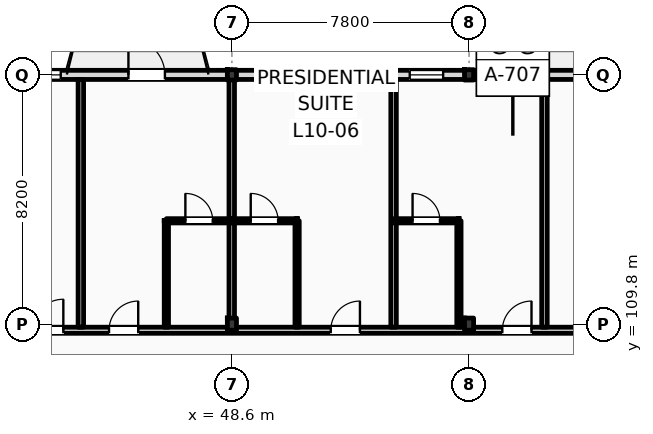
"""IFC4 building model, lengths in metres.
Left out: names, types, materials, properties, quantities, classifications, styles, units other than length and angle.
Written with IfcOpenShell. Run it as: python <this file> out.ifc"""

import sys

from ifc_helpers import new_model, si_unit, direction, frame, frame_2d, origin, origin_2d, place, context, subcontext, project, spatial, rectangle, i_section, extrude, element, fill, save


model = new_model("IFC4")
c1 = context("Model", 3, precision=1e-05, world=origin(), true_north=direction((0.0, 1.0)))
c2 = subcontext(c1, "Body", "Model", "MODEL_VIEW")
j1 = project(units=[si_unit("LENGTHUNIT", "METRE"), si_unit("PLANEANGLEUNIT", "RADIAN")], contexts=[c1])
p1 = place(None, origin())
s1 = spatial("IfcSite", under=j1, at=p1, CompositionType="ELEMENT")
p2 = place(p1, origin())
s2 = spatial("IfcBuilding", under=s1, at=p2, CompositionType="ELEMENT")
p3 = place(p2, frame((0.0, 0.0, 42.6)))
s3 = spatial("IfcBuildingStorey", under=s2, at=p3, CompositionType="ELEMENT", Elevation=42.6)
p4 = place(p3, frame((48.6, 109.8, 0.0), z_axis=(0.0, 0.0, 1.0), x_axis=(1.0, 0.0, 0.0)))
e1 = element("IfcColumn", 1, at=p4, inside=s3, PredefinedType="COLUMN", context=c2, shape_type="SweptSolid", body=[
    extrude(i_section(OverallWidth=0.3, OverallDepth=0.4, WebThickness=0.013, FlangeThickness=0.024, FilletRadius=0.027, at=origin_2d()), origin(), (0.0, 0.0, 1.0), 4.2),
])
p5 = place(p3, frame((48.6, 118.0, 0.0), z_axis=(0.0, 0.0, 1.0), x_axis=(1.0, 0.0, 0.0)))
e2 = element("IfcColumn", 2, at=p5, inside=s3, PredefinedType="COLUMN", context=c2, shape_type="SweptSolid", body=[
    extrude(i_section(OverallWidth=0.3, OverallDepth=0.34, WebThickness=0.012, FlangeThickness=0.021, FilletRadius=0.027, at=origin_2d()), origin(), (0.0, 0.0, 1.0), 4.2),
])
p6 = place(p3, frame((56.4, 109.8, 0.0), z_axis=(0.0, 0.0, 1.0), x_axis=(1.0, 0.0, 0.0)))
e3 = element("IfcColumn", 3, at=p6, inside=s3, PredefinedType="COLUMN", context=c2, shape_type="SweptSolid", body=[
    extrude(i_section(OverallWidth=0.3, OverallDepth=0.4, WebThickness=0.013, FlangeThickness=0.024, FilletRadius=0.027, at=origin_2d()), origin(), (0.0, 0.0, 1.0), 4.2),
])
p7 = place(p3, frame((56.4, 118.0, 0.0), z_axis=(0.0, 0.0, 1.0), x_axis=(1.0, 0.0, 0.0)))
e4 = element("IfcColumn", 4, at=p7, inside=s3, PredefinedType="COLUMN", context=c2, shape_type="SweptSolid", body=[
    extrude(i_section(OverallWidth=0.3, OverallDepth=0.34, WebThickness=0.012, FlangeThickness=0.021, FilletRadius=0.027, at=origin_2d()), origin(), (0.0, 0.0, 1.0), 4.2),
])
p8 = place(p3, frame((22.5, 118.0, 0.0), z_axis=(0.0, 0.0, 1.0), x_axis=(1.0, 0.0, 0.0)))
e5 = element("IfcWall", 5, at=p8, inside=s3, PredefinedType="STANDARD", context=c2, shape_type="SweptSolid", body=[
    extrude(rectangle(XDim=72.9, YDim=0.3, at=frame_2d((36.45, 0.0))), origin(), (0.0, 0.0, 1.0), 3.42),
])
p9 = place(p8, frame((3.611, 0.0, 0.9)))
e6 = element("IfcOpeningElement", 6, at=p9, cuts=e5, PredefinedType="OPENING", context=c2, shape_type="SweptSolid", body=[
    extrude(rectangle(XDim=1.35, YDim=1.75, at=frame_2d((0.675, 0.875))), frame((0.0, 0.16, 0.0), z_axis=(0.0, -1.0, 0.0), x_axis=(1.0, 0.0, 0.0)), (0.0, 0.0, 1.0), 0.32),
])
p10 = place(p8, frame((7.091, 0.0, 0.0)))
e7 = element("IfcOpeningElement", 7, at=p10, cuts=e5, PredefinedType="OPENING", context=c2, shape_type="SweptSolid", body=[
    extrude(rectangle(XDim=1.2, YDim=2.25, at=frame_2d((0.6, 1.125))), frame((0.0, 0.16, 0.0), z_axis=(0.0, -1.0, 0.0), x_axis=(1.0, 0.0, 0.0)), (0.0, 0.0, 1.0), 0.32),
])
p11 = place(p8, frame((12.328, 0.0, 0.9)))
e8 = element("IfcOpeningElement", 8, at=p11, cuts=e5, PredefinedType="OPENING", context=c2, shape_type="SweptSolid", body=[
    extrude(rectangle(XDim=2.0, YDim=2.34, at=frame_2d((1.0, 1.17))), frame((0.0, 0.16, 0.0), z_axis=(0.0, -1.0, 0.0), x_axis=(1.0, 0.0, 0.0)), (0.0, 0.0, 1.0), 0.32),
])
p12 = place(p8, frame((19.12, 0.0, 0.9)))
e9 = element("IfcOpeningElement", 9, at=p12, cuts=e5, PredefinedType="OPENING", context=c2, shape_type="SweptSolid", body=[
    extrude(rectangle(XDim=1.35, YDim=2.34, at=frame_2d((0.675, 1.17))), frame((0.0, 0.16, 0.0), z_axis=(0.0, -1.0, 0.0), x_axis=(1.0, 0.0, 0.0)), (0.0, 0.0, 1.0), 0.32),
])
p13 = place(p8, frame((22.696, 0.0, 0.0)))
e10 = element("IfcOpeningElement", 10, at=p13, cuts=e5, PredefinedType="OPENING", context=c2, shape_type="SweptSolid", body=[
    extrude(rectangle(XDim=1.2, YDim=2.25, at=frame_2d((0.6, 1.125))), frame((0.0, 0.16, 0.0), z_axis=(0.0, -1.0, 0.0), x_axis=(1.0, 0.0, 0.0)), (0.0, 0.0, 1.0), 0.32),
])
p14 = place(p8, frame((27.205, 0.0, 0.9)))
e11 = element("IfcOpeningElement", 11, at=p14, cuts=e5, PredefinedType="OPENING", context=c2, shape_type="SweptSolid", body=[
    extrude(rectangle(XDim=3.1, YDim=2.34, at=frame_2d((1.55, 1.17))), frame((0.0, 0.16, 0.0), z_axis=(0.0, -1.0, 0.0), x_axis=(1.0, 0.0, 0.0)), (0.0, 0.0, 1.0), 0.32),
])
p15 = place(p8, frame((31.948, 0.0, 0.9)))
e12 = element("IfcOpeningElement", 12, at=p15, cuts=e5, PredefinedType="OPENING", context=c2, shape_type="SweptSolid", body=[
    extrude(rectangle(XDim=1.1, YDim=2.34, at=frame_2d((0.55, 1.17))), frame((0.0, 0.16, 0.0), z_axis=(0.0, -1.0, 0.0), x_axis=(1.0, 0.0, 0.0)), (0.0, 0.0, 1.0), 0.32),
])
p16 = place(p8, frame((38.12, 0.0, 0.0)))
e13 = element("IfcOpeningElement", 13, at=p16, cuts=e5, PredefinedType="OPENING", context=c2, shape_type="SweptSolid", body=[
    extrude(rectangle(XDim=1.2, YDim=2.25, at=frame_2d((0.6, 1.125))), frame((0.0, 0.16, 0.0), z_axis=(0.0, -1.0, 0.0), x_axis=(1.0, 0.0, 0.0)), (0.0, 0.0, 1.0), 0.32),
])
p17 = place(p8, frame((43.51, 0.0, 0.9)))
e14 = element("IfcOpeningElement", 14, at=p17, cuts=e5, PredefinedType="OPENING", context=c2, shape_type="SweptSolid", body=[
    extrude(rectangle(XDim=1.35, YDim=1.85, at=frame_2d((0.675, 0.925))), frame((0.0, 0.16, 0.0), z_axis=(0.0, -1.0, 0.0), x_axis=(1.0, 0.0, 0.0)), (0.0, 0.0, 1.0), 0.32),
])
p18 = place(p8, frame((47.178, 0.0, 0.9)))
e15 = element("IfcOpeningElement", 15, at=p18, cuts=e5, PredefinedType="OPENING", context=c2, shape_type="SweptSolid", body=[
    extrude(rectangle(XDim=1.5, YDim=1.9, at=frame_2d((0.75, 0.95))), frame((0.0, 0.16, 0.0), z_axis=(0.0, -1.0, 0.0), x_axis=(1.0, 0.0, 0.0)), (0.0, 0.0, 1.0), 0.32),
])
p19 = place(p8, frame((53.724, 0.0, 0.0)))
e16 = element("IfcOpeningElement", 16, at=p19, cuts=e5, PredefinedType="OPENING", context=c2, shape_type="SweptSolid", body=[
    extrude(rectangle(XDim=1.2, YDim=2.25, at=frame_2d((0.6, 1.125))), frame((0.0, 0.16, 0.0), z_axis=(0.0, -1.0, 0.0), x_axis=(1.0, 0.0, 0.0)), (0.0, 0.0, 1.0), 0.32),
])
p20 = place(p8, frame((58.712, 0.0, 0.9)))
e17 = element("IfcOpeningElement", 17, at=p20, cuts=e5, PredefinedType="OPENING", context=c2, shape_type="SweptSolid", body=[
    extrude(rectangle(XDim=1.8, YDim=2.0, at=frame_2d((0.9, 1.0))), frame((0.0, 0.16, 0.0), z_axis=(0.0, -1.0, 0.0), x_axis=(1.0, 0.0, 0.0)), (0.0, 0.0, 1.0), 0.32),
])
p21 = place(p8, frame((62.781, 0.0, 0.9)))
e18 = element("IfcOpeningElement", 18, at=p21, cuts=e5, PredefinedType="OPENING", context=c2, shape_type="SweptSolid", body=[
    extrude(rectangle(XDim=1.35, YDim=2.05, at=frame_2d((0.675, 1.025))), frame((0.0, 0.16, 0.0), z_axis=(0.0, -1.0, 0.0), x_axis=(1.0, 0.0, 0.0)), (0.0, 0.0, 1.0), 0.32),
])
p22 = place(p8, frame((68.819, 0.0, 0.9)))
e19 = element("IfcOpeningElement", 19, at=p22, cuts=e5, PredefinedType="OPENING", context=c2, shape_type="SweptSolid", body=[
    extrude(rectangle(XDim=2.1, YDim=2.1, at=frame_2d((1.05, 1.05))), frame((0.0, 0.16, 0.0), z_axis=(0.0, -1.0, 0.0), x_axis=(1.0, 0.0, 0.0)), (0.0, 0.0, 1.0), 0.32),
])
p23 = place(p3, frame((10.65, 109.6, 0.0), z_axis=(0.0, 0.0, 1.0), x_axis=(1.0, 0.0, 0.0)))
e20 = element("IfcWall", 20, at=p23, inside=s3, PredefinedType="PARTITIONING", context=c2, shape_type="SweptSolid", body=[
    extrude(rectangle(XDim=84.61, YDim=0.2, at=frame_2d((42.305, 0.0))), origin(), (0.0, 0.0, 1.0), 3.38),
])
p24 = place(p23, frame((15.926, 0.0, 0.0)))
e21 = element("IfcOpeningElement", 21, at=p24, cuts=e20, PredefinedType="OPENING", context=c2, shape_type="SweptSolid", body=[
    extrude(rectangle(XDim=1.02, YDim=2.2, at=frame_2d((0.51, 1.1))), frame((0.0, 0.11, 0.0), z_axis=(0.0, -1.0, 0.0), x_axis=(1.0, 0.0, 0.0)), (0.0, 0.0, 1.0), 0.22),
])
p25 = place(p23, frame((18.45, 0.0, 0.0)))
e22 = element("IfcOpeningElement", 22, at=p25, cuts=e20, PredefinedType="OPENING", context=c2, shape_type="SweptSolid", body=[
    extrude(rectangle(XDim=1.02, YDim=2.2, at=frame_2d((0.51, 1.1))), frame((0.0, 0.11, 0.0), z_axis=(0.0, -1.0, 0.0), x_axis=(1.0, 0.0, 0.0)), (0.0, 0.0, 1.0), 0.22),
])
p26 = place(p23, frame((25.742, 0.0, 0.0)))
e23 = element("IfcOpeningElement", 23, at=p26, cuts=e20, PredefinedType="OPENING", context=c2, shape_type="SweptSolid", body=[
    extrude(rectangle(XDim=1.02, YDim=2.2, at=frame_2d((0.51, 1.1))), frame((0.0, 0.11, 0.0), z_axis=(0.0, -1.0, 0.0), x_axis=(1.0, 0.0, 0.0)), (0.0, 0.0, 1.0), 0.22),
])
p27 = place(p23, frame((31.385, 0.0, 0.0)))
e24 = element("IfcOpeningElement", 24, at=p27, cuts=e20, PredefinedType="OPENING", context=c2, shape_type="SweptSolid", body=[
    extrude(rectangle(XDim=1.02, YDim=2.2, at=frame_2d((0.51, 1.1))), frame((0.0, 0.11, 0.0), z_axis=(0.0, -1.0, 0.0), x_axis=(1.0, 0.0, 0.0)), (0.0, 0.0, 1.0), 0.22),
])
p28 = place(p23, frame((33.908, 0.0, 0.0)))
e25 = element("IfcOpeningElement", 25, at=p28, cuts=e20, PredefinedType="OPENING", context=c2, shape_type="SweptSolid", body=[
    extrude(rectangle(XDim=0.96, YDim=2.2, at=frame_2d((0.48, 1.1))), frame((0.0, 0.11, 0.0), z_axis=(0.0, -1.0, 0.0), x_axis=(1.0, 0.0, 0.0)), (0.0, 0.0, 1.0), 0.22),
])
p29 = place(p23, frame((41.201, 0.0, 0.0)))
e26 = element("IfcOpeningElement", 26, at=p29, cuts=e20, PredefinedType="OPENING", context=c2, shape_type="SweptSolid", body=[
    extrude(rectangle(XDim=0.96, YDim=2.2, at=frame_2d((0.48, 1.1))), frame((0.0, 0.11, 0.0), z_axis=(0.0, -1.0, 0.0), x_axis=(1.0, 0.0, 0.0)), (0.0, 0.0, 1.0), 0.22),
])
p30 = place(p23, frame((46.844, 0.0, 0.0)))
e27 = element("IfcOpeningElement", 27, at=p30, cuts=e20, PredefinedType="OPENING", context=c2, shape_type="SweptSolid", body=[
    extrude(rectangle(XDim=0.96, YDim=2.2, at=frame_2d((0.48, 1.1))), frame((0.0, 0.11, 0.0), z_axis=(0.0, -1.0, 0.0), x_axis=(1.0, 0.0, 0.0)), (0.0, 0.0, 1.0), 0.22),
])
p31 = place(p23, frame((49.337, 0.0, 0.0)))
e28 = element("IfcOpeningElement", 28, at=p31, cuts=e20, PredefinedType="OPENING", context=c2, shape_type="SweptSolid", body=[
    extrude(rectangle(XDim=0.96, YDim=2.2, at=frame_2d((0.48, 1.1))), frame((0.0, 0.11, 0.0), z_axis=(0.0, -1.0, 0.0), x_axis=(1.0, 0.0, 0.0)), (0.0, 0.0, 1.0), 0.22),
])
p32 = place(p23, frame((56.63, 0.0, 0.0)))
e29 = element("IfcOpeningElement", 29, at=p32, cuts=e20, PredefinedType="OPENING", context=c2, shape_type="SweptSolid", body=[
    extrude(rectangle(XDim=0.96, YDim=2.2, at=frame_2d((0.48, 1.1))), frame((0.0, 0.11, 0.0), z_axis=(0.0, -1.0, 0.0), x_axis=(1.0, 0.0, 0.0)), (0.0, 0.0, 1.0), 0.22),
])
p33 = place(p23, frame((62.523, 0.0, 0.0)))
e30 = element("IfcOpeningElement", 30, at=p33, cuts=e20, PredefinedType="OPENING", context=c2, shape_type="SweptSolid", body=[
    extrude(rectangle(XDim=0.96, YDim=2.2, at=frame_2d((0.48, 1.1))), frame((0.0, 0.11, 0.0), z_axis=(0.0, -1.0, 0.0), x_axis=(1.0, 0.0, 0.0)), (0.0, 0.0, 1.0), 0.22),
])
p34 = place(p23, frame((64.765, 0.0, 0.0)))
e31 = element("IfcOpeningElement", 31, at=p34, cuts=e20, PredefinedType="OPENING", context=c2, shape_type="SweptSolid", body=[
    extrude(rectangle(XDim=0.96, YDim=2.2, at=frame_2d((0.48, 1.1))), frame((0.0, 0.11, 0.0), z_axis=(0.0, -1.0, 0.0), x_axis=(1.0, 0.0, 0.0)), (0.0, 0.0, 1.0), 0.22),
])
p35 = place(p23, frame((72.057, 0.0, 0.0)))
e32 = element("IfcOpeningElement", 32, at=p35, cuts=e20, PredefinedType="OPENING", context=c2, shape_type="SweptSolid", body=[
    extrude(rectangle(XDim=0.96, YDim=2.2, at=frame_2d((0.48, 1.1))), frame((0.0, 0.11, 0.0), z_axis=(0.0, -1.0, 0.0), x_axis=(1.0, 0.0, 0.0)), (0.0, 0.0, 1.0), 0.22),
])
p36 = place(p23, frame((74.55, 0.0, 0.0)))
e33 = element("IfcOpeningElement", 33, at=p36, cuts=e20, PredefinedType="OPENING", context=c2, shape_type="SweptSolid", body=[
    extrude(rectangle(XDim=0.96, YDim=2.2, at=frame_2d((0.48, 1.1))), frame((0.0, 0.11, 0.0), z_axis=(0.0, -1.0, 0.0), x_axis=(1.0, 0.0, 0.0)), (0.0, 0.0, 1.0), 0.22),
])
p37 = place(p23, frame((80.163, 0.0, 0.0)))
e34 = element("IfcOpeningElement", 34, at=p37, cuts=e20, PredefinedType="OPENING", context=c2, shape_type="SweptSolid", body=[
    extrude(rectangle(XDim=0.96, YDim=2.2, at=frame_2d((0.48, 1.1))), frame((0.0, 0.11, 0.0), z_axis=(0.0, -1.0, 0.0), x_axis=(1.0, 0.0, 0.0)), (0.0, 0.0, 1.0), 0.22),
])
p38 = place(p23, frame((2.716, 0.0, 0.0)))
e35 = element("IfcOpeningElement", 35, at=p38, cuts=e20, PredefinedType="OPENING", context=c2, shape_type="SweptSolid", body=[
    extrude(rectangle(XDim=1.35, YDim=2.25, at=frame_2d((0.675, 1.125))), frame((0.0, 0.11, 0.0), z_axis=(0.0, -1.0, 0.0), x_axis=(1.0, 0.0, 0.0)), (0.0, 0.0, 1.0), 0.22),
])
p39 = place(p23, frame((6.65, 0.0, 0.0)))
e36 = element("IfcOpeningElement", 36, at=p39, cuts=e20, PredefinedType="OPENING", context=c2, shape_type="SweptSolid", body=[
    extrude(rectangle(XDim=1.35, YDim=2.25, at=frame_2d((0.675, 1.125))), frame((0.0, 0.11, 0.0), z_axis=(0.0, -1.0, 0.0), x_axis=(1.0, 0.0, 0.0)), (0.0, 0.0, 1.0), 0.22),
])
p40 = place(p23, frame((10.583, 0.0, 0.0)))
e37 = element("IfcOpeningElement", 37, at=p40, cuts=e20, PredefinedType="OPENING", context=c2, shape_type="SweptSolid", body=[
    extrude(rectangle(XDim=1.35, YDim=2.25, at=frame_2d((0.675, 1.125))), frame((0.0, 0.11, 0.0), z_axis=(0.0, -1.0, 0.0), x_axis=(1.0, 0.0, 0.0)), (0.0, 0.0, 1.0), 0.22),
])
p41 = place(p3, frame((43.631, 109.7, 0.0), z_axis=(0.0, 0.0, 1.0), x_axis=(0.0, 1.0, 0.0)))
e38 = element("IfcWall", 38, at=p41, inside=s3, PredefinedType="PARTITIONING", context=c2, shape_type="SweptSolid", body=[
    extrude(rectangle(XDim=8.15, YDim=0.18, at=frame_2d((4.075, 0.0))), origin(), (0.0, 0.0, 1.0), 3.63),
])
p42 = place(p3, frame((48.594, 109.7, 0.0), z_axis=(0.0, 0.0, 1.0), x_axis=(0.0, 1.0, 0.0)))
e39 = element("IfcWall", 39, at=p42, inside=s3, PredefinedType="PARTITIONING", context=c2, shape_type="SweptSolid", body=[
    extrude(rectangle(XDim=8.15, YDim=0.18, at=frame_2d((4.075, 0.0))), origin(), (0.0, 0.0, 1.0), 3.57),
])
p43 = place(p3, frame((46.444, 109.7, 0.0), z_axis=(0.0, 0.0, 1.0), x_axis=(0.0, 1.0, 0.0)))
e40 = element("IfcWall", 40, at=p43, inside=s3, PredefinedType="PARTITIONING", context=c2, shape_type="SweptSolid", body=[
    extrude(rectangle(XDim=3.5, YDim=0.14, at=frame_2d((1.75, 0.0))), origin(), (0.0, 0.0, 1.0), 3.94),
])
p44 = place(p3, frame((46.444, 113.2, 0.0), z_axis=(0.0, 0.0, 1.0), x_axis=(1.0, 0.0, 0.0)))
e41 = element("IfcWall", 41, at=p44, inside=s3, PredefinedType="PARTITIONING", context=c2, shape_type="SweptSolid", body=[
    extrude(rectangle(XDim=2.15, YDim=0.14, at=frame_2d((1.075, 0.0))), origin(), (0.0, 0.0, 1.0), 3.94),
])
p45 = place(p44, frame((0.625, 0.0, 0.0)))
e42 = element("IfcOpeningElement", 42, at=p45, cuts=e41, PredefinedType="OPENING", context=c2, shape_type="SweptSolid", body=[
    extrude(rectangle(XDim=0.9, YDim=2.1, at=frame_2d((0.45, 1.05))), frame((0.0, 0.08, 0.0), z_axis=(0.0, -1.0, 0.0), x_axis=(1.0, 0.0, 0.0)), (0.0, 0.0, 1.0), 0.16),
])
p46 = place(p3, frame((53.917, 109.7, 0.0), z_axis=(0.0, 0.0, 1.0), x_axis=(0.0, 1.0, 0.0)))
e43 = element("IfcWall", 43, at=p46, inside=s3, PredefinedType="PARTITIONING", context=c2, shape_type="SweptSolid", body=[
    extrude(rectangle(XDim=8.15, YDim=0.18, at=frame_2d((4.075, 0.0))), origin(), (0.0, 0.0, 1.0), 3.63),
])
p47 = place(p3, frame((50.744, 109.7, 0.0), z_axis=(0.0, 0.0, 1.0), x_axis=(0.0, 1.0, 0.0)))
e44 = element("IfcWall", 44, at=p47, inside=s3, PredefinedType="PARTITIONING", context=c2, shape_type="SweptSolid", body=[
    extrude(rectangle(XDim=3.5, YDim=0.14, at=frame_2d((1.75, 0.0))), origin(), (0.0, 0.0, 1.0), 3.94),
])
p48 = place(p3, frame((48.594, 113.2, 0.0), z_axis=(0.0, 0.0, 1.0), x_axis=(1.0, 0.0, 0.0)))
e45 = element("IfcWall", 45, at=p48, inside=s3, PredefinedType="PARTITIONING", context=c2, shape_type="SweptSolid", body=[
    extrude(rectangle(XDim=2.15, YDim=0.14, at=frame_2d((1.075, 0.0))), origin(), (0.0, 0.0, 1.0), 3.94),
])
p49 = place(p48, frame((0.625, 0.0, 0.0)))
e46 = element("IfcOpeningElement", 46, at=p49, cuts=e45, PredefinedType="OPENING", context=c2, shape_type="SweptSolid", body=[
    extrude(rectangle(XDim=0.9, YDim=2.1, at=frame_2d((0.45, 1.05))), frame((0.0, 0.08, 0.0), z_axis=(0.0, -1.0, 0.0), x_axis=(1.0, 0.0, 0.0)), (0.0, 0.0, 1.0), 0.16),
])
p50 = place(p3, frame((58.88, 109.7, 0.0), z_axis=(0.0, 0.0, 1.0), x_axis=(0.0, 1.0, 0.0)))
e47 = element("IfcWall", 47, at=p50, inside=s3, PredefinedType="PARTITIONING", context=c2, shape_type="SweptSolid", body=[
    extrude(rectangle(XDim=8.15, YDim=0.18, at=frame_2d((4.075, 0.0))), origin(), (0.0, 0.0, 1.0), 3.63),
])
p51 = place(p3, frame((56.067, 109.7, 0.0), z_axis=(0.0, 0.0, 1.0), x_axis=(0.0, 1.0, 0.0)))
e48 = element("IfcWall", 48, at=p51, inside=s3, PredefinedType="PARTITIONING", context=c2, shape_type="SweptSolid", body=[
    extrude(rectangle(XDim=3.5, YDim=0.14, at=frame_2d((1.75, 0.0))), origin(), (0.0, 0.0, 1.0), 3.94),
])
p52 = place(p3, frame((53.917, 113.2, 0.0), z_axis=(0.0, 0.0, 1.0), x_axis=(1.0, 0.0, 0.0)))
e49 = element("IfcWall", 49, at=p52, inside=s3, PredefinedType="PARTITIONING", context=c2, shape_type="SweptSolid", body=[
    extrude(rectangle(XDim=2.15, YDim=0.14, at=frame_2d((1.075, 0.0))), origin(), (0.0, 0.0, 1.0), 3.94),
])
p53 = place(p52, frame((0.625, 0.0, 0.0)))
e50 = element("IfcOpeningElement", 50, at=p53, cuts=e49, PredefinedType="OPENING", context=c2, shape_type="SweptSolid", body=[
    extrude(rectangle(XDim=0.9, YDim=2.1, at=frame_2d((0.45, 1.05))), frame((0.0, 0.08, 0.0), z_axis=(0.0, -1.0, 0.0), x_axis=(1.0, 0.0, 0.0)), (0.0, 0.0, 1.0), 0.16),
])
p54 = place(p12, origin())
e51 = element("IfcWindow", 51, at=p54, inside=s3, PartitioningType="DOUBLE_PANEL_VERTICAL", PredefinedType="WINDOW", context=c2, shape_type="SweptSolid", body=[
    extrude(rectangle(XDim=1.35, YDim=2.34, at=frame_2d((0.675, 1.17))), frame((0.0, 0.03, 0.0), z_axis=(0.0, -1.0, 0.0), x_axis=(1.0, 0.0, 0.0)), (0.0, 0.0, 1.0), 0.06),
])
fill(e9, e51)
p55 = place(p13, origin())
e52 = element("IfcDoor", 52, at=p55, inside=s3, OperationType="SINGLE_SWING_LEFT", PredefinedType="DOOR", context=c2, shape_type="SweptSolid", body=[
    extrude(rectangle(XDim=1.2, YDim=2.25, at=frame_2d((0.6, 1.125))), frame((0.0, 0.025, 0.0), z_axis=(0.0, -1.0, 0.0), x_axis=(1.0, 0.0, 0.0)), (0.0, 0.0, 1.0), 0.05),
])
fill(e10, e52)
p56 = place(p14, origin())
e53 = element("IfcWindow", 53, at=p56, inside=s3, PartitioningType="DOUBLE_PANEL_VERTICAL", PredefinedType="WINDOW", context=c2, shape_type="SweptSolid", body=[
    extrude(rectangle(XDim=3.1, YDim=2.34, at=frame_2d((1.55, 1.17))), frame((0.0, 0.03, 0.0), z_axis=(0.0, -1.0, 0.0), x_axis=(1.0, 0.0, 0.0)), (0.0, 0.0, 1.0), 0.06),
])
fill(e11, e53)
p57 = place(p15, origin())
e54 = element("IfcWindow", 54, at=p57, inside=s3, PartitioningType="DOUBLE_PANEL_VERTICAL", PredefinedType="WINDOW", context=c2, shape_type="SweptSolid", body=[
    extrude(rectangle(XDim=1.1, YDim=2.34, at=frame_2d((0.55, 1.17))), frame((0.0, 0.03, 0.0), z_axis=(0.0, -1.0, 0.0), x_axis=(1.0, 0.0, 0.0)), (0.0, 0.0, 1.0), 0.06),
])
fill(e12, e54)
p58 = place(p27, origin())
e55 = element("IfcDoor", 55, at=p58, inside=s3, OperationType="SINGLE_SWING_RIGHT", PredefinedType="DOOR", context=c2, shape_type="SweptSolid", body=[
    extrude(rectangle(XDim=1.02, YDim=2.2, at=frame_2d((0.51, 1.1))), frame((0.0, 0.025, 0.0), z_axis=(0.0, -1.0, 0.0), x_axis=(1.0, 0.0, 0.0)), (0.0, 0.0, 1.0), 0.05),
])
fill(e24, e55)
p59 = place(p28, origin())
e56 = element("IfcDoor", 56, at=p59, inside=s3, OperationType="SINGLE_SWING_RIGHT", PredefinedType="DOOR", context=c2, shape_type="SweptSolid", body=[
    extrude(rectangle(XDim=0.96, YDim=2.2, at=frame_2d((0.48, 1.1))), frame((0.0, 0.025, 0.0), z_axis=(0.0, -1.0, 0.0), x_axis=(1.0, 0.0, 0.0)), (0.0, 0.0, 1.0), 0.05),
])
fill(e25, e56)
p60 = place(p45, origin())
e57 = element("IfcDoor", 57, at=p60, inside=s3, OperationType="SINGLE_SWING_LEFT", PredefinedType="DOOR", context=c2, shape_type="SweptSolid", body=[
    extrude(rectangle(XDim=0.9, YDim=2.1, at=frame_2d((0.45, 1.05))), frame((0.0, 0.025, 0.0), z_axis=(0.0, -1.0, 0.0), x_axis=(1.0, 0.0, 0.0)), (0.0, 0.0, 1.0), 0.05),
])
fill(e42, e57)
p61 = place(p29, origin())
e58 = element("IfcDoor", 58, at=p61, inside=s3, OperationType="SINGLE_SWING_RIGHT", PredefinedType="DOOR", context=c2, shape_type="SweptSolid", body=[
    extrude(rectangle(XDim=0.96, YDim=2.2, at=frame_2d((0.48, 1.1))), frame((0.0, 0.025, 0.0), z_axis=(0.0, -1.0, 0.0), x_axis=(1.0, 0.0, 0.0)), (0.0, 0.0, 1.0), 0.05),
])
fill(e26, e58)
p62 = place(p49, origin())
e59 = element("IfcDoor", 59, at=p62, inside=s3, OperationType="SINGLE_SWING_LEFT", PredefinedType="DOOR", context=c2, shape_type="SweptSolid", body=[
    extrude(rectangle(XDim=0.9, YDim=2.1, at=frame_2d((0.45, 1.05))), frame((0.0, 0.025, 0.0), z_axis=(0.0, -1.0, 0.0), x_axis=(1.0, 0.0, 0.0)), (0.0, 0.0, 1.0), 0.05),
])
fill(e46, e59)
p63 = place(p30, origin())
e60 = element("IfcDoor", 60, at=p63, inside=s3, OperationType="SINGLE_SWING_RIGHT", PredefinedType="DOOR", context=c2, shape_type="SweptSolid", body=[
    extrude(rectangle(XDim=0.96, YDim=2.2, at=frame_2d((0.48, 1.1))), frame((0.0, 0.025, 0.0), z_axis=(0.0, -1.0, 0.0), x_axis=(1.0, 0.0, 0.0)), (0.0, 0.0, 1.0), 0.05),
])
fill(e27, e60)
p64 = place(p53, origin())
e61 = element("IfcDoor", 61, at=p64, inside=s3, OperationType="SINGLE_SWING_LEFT", PredefinedType="DOOR", context=c2, shape_type="SweptSolid", body=[
    extrude(rectangle(XDim=0.9, YDim=2.1, at=frame_2d((0.45, 1.05))), frame((0.0, 0.025, 0.0), z_axis=(0.0, -1.0, 0.0), x_axis=(1.0, 0.0, 0.0)), (0.0, 0.0, 1.0), 0.05),
])
fill(e50, e61)
save(model, sys.argv[1])
